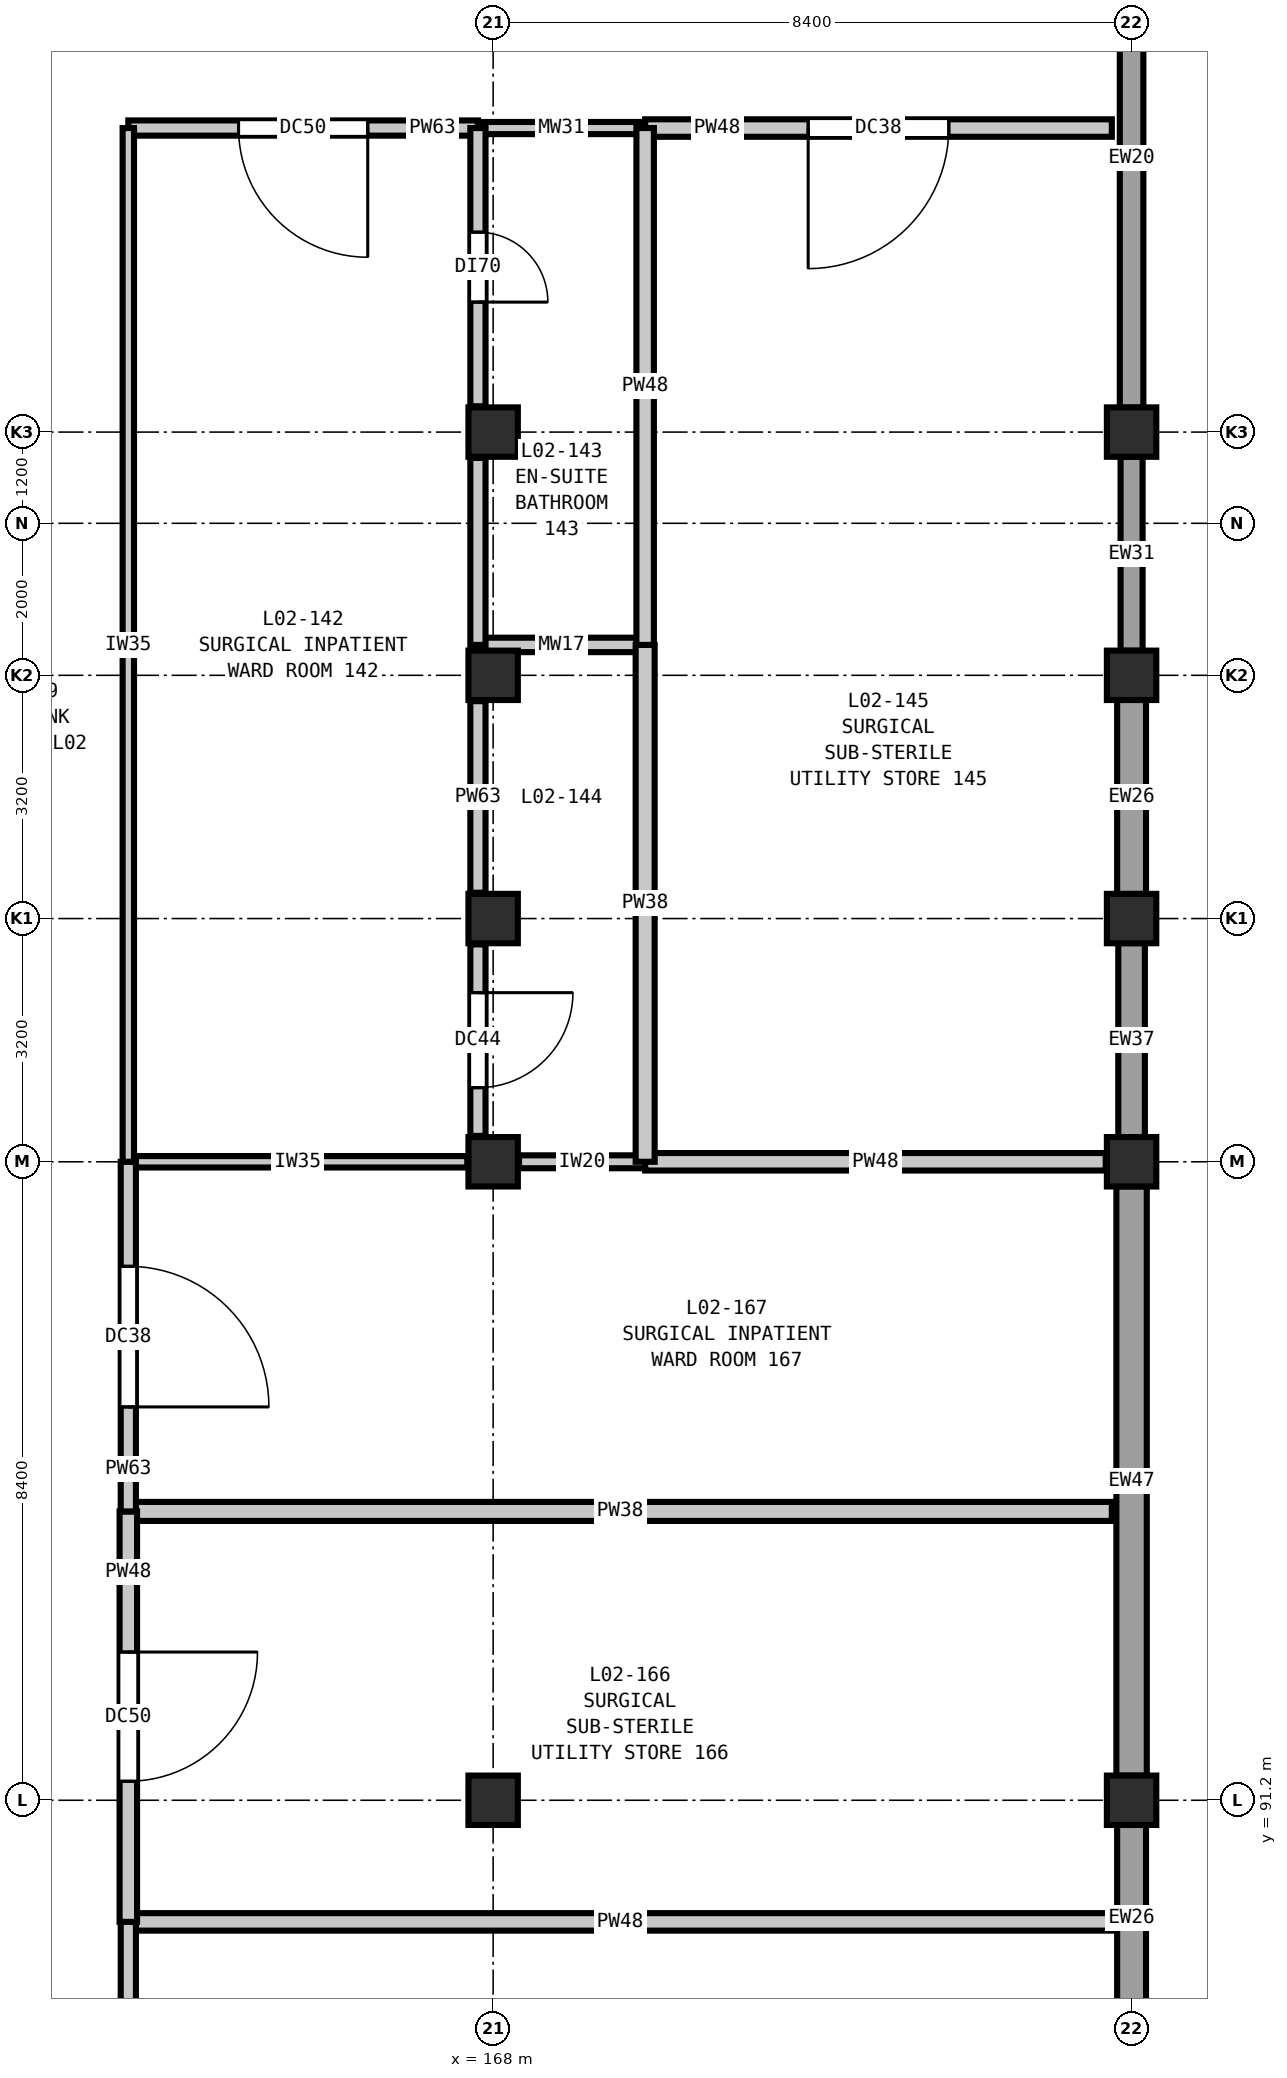
"""IFC4 building model, lengths in metres.
Left out: names, types, materials, properties, quantities, classifications, styles, units other than length and angle.
Written with IfcOpenShell. Run it as: python <this file> out.ifc"""

import sys

from ifc_helpers import new_model, si_unit, direction, frame, frame_2d, origin, origin_2d, place, context, subcontext, project, spatial, rectangle, extrude, element, fill, save


model = new_model("IFC4")
c1 = context("Model", 3, precision=1e-05, world=origin(), true_north=direction((0.0, 1.0)))
c2 = subcontext(c1, "Body", "Model", "MODEL_VIEW")
j1 = project(units=[si_unit("LENGTHUNIT", "METRE"), si_unit("PLANEANGLEUNIT", "RADIAN")], contexts=[c1])
p1 = place(None, origin())
s1 = spatial("IfcSite", under=j1, at=p1, CompositionType="ELEMENT")
p2 = place(p1, origin())
s2 = spatial("IfcBuilding", under=s1, at=p2, CompositionType="ELEMENT")
p3 = place(p2, frame((0.0, 0.0, 10.8)))
s3 = spatial("IfcBuildingStorey", under=s2, at=p3, CompositionType="ELEMENT", Elevation=10.8)
for number, where, z_axis, x_axis in (
    (1, (168.0, 91.2, 0.0), (0.0, 0.0, 1.0), (1.0, 0.0, 0.0)),
    (2, (168.0, 99.6, 0.0), (0.0, 0.0, 1.0), (1.0, 0.0, 0.0)),
    (3, (168.0, 102.8, 0.0), (0.0, 0.0, 1.0), (1.0, 0.0, 0.0)),
    (4, (168.0, 106.0, 0.0), (0.0, 0.0, 1.0), (1.0, 0.0, 0.0)),
    (5, (168.0, 109.2, 0.0), (0.0, 0.0, 1.0), (1.0, 0.0, 0.0)),
    (6, (176.4, 91.2, 0.0), (0.0, 0.0, 1.0), (1.0, 0.0, 0.0)),
    (7, (176.4, 99.6, 0.0), (0.0, 0.0, 1.0), (1.0, 0.0, 0.0)),
    (8, (176.4, 102.8, 0.0), (0.0, 0.0, 1.0), (1.0, 0.0, 0.0)),
    (9, (176.4, 106.0, 0.0), (0.0, 0.0, 1.0), (1.0, 0.0, 0.0)),
    (10, (176.4, 109.2, 0.0), (0.0, 0.0, 1.0), (1.0, 0.0, 0.0)),
):
    element("IfcColumn", number, at=place(p3, frame(where, z_axis=z_axis, x_axis=x_axis)), inside=s3, PredefinedType="COLUMN", context=c2, shape_type="SweptSolid", body=[
        extrude(rectangle(XDim=0.65, YDim=0.65, at=origin_2d()), origin(), (0.0, 0.0, 1.0), 5.4),
    ])
p4 = place(p3, frame((176.4, 116.077, 0.0), z_axis=(0.0, 0.0, 1.0), x_axis=(0.0, -1.0, 0.0)))
e11 = element("IfcWall", 11, at=p4, inside=s3, PredefinedType="SOLIDWALL", context=c2, shape_type="SweptSolid", body=[
    extrude(rectangle(XDim=6.554, YDim=0.31, at=frame_2d((3.277, 0.0))), origin(), (0.0, 0.0, 1.0), 4.68),
])
p5 = place(p3, frame((176.4, 108.877, 0.0), z_axis=(0.0, 0.0, 1.0), x_axis=(0.0, -1.0, 0.0)))
e12 = element("IfcWall", 12, at=p5, inside=s3, PredefinedType="SOLIDWALL", context=c2, shape_type="SweptSolid", body=[
    extrude(rectangle(XDim=2.554, YDim=0.29, at=frame_2d((1.277, 0.0))), origin(), (0.0, 0.0, 1.0), 4.68),
])
p6 = place(p3, frame((176.4, 105.677, 0.0), z_axis=(0.0, 0.0, 1.0), x_axis=(0.0, -1.0, 0.0)))
e13 = element("IfcWall", 13, at=p6, inside=s3, PredefinedType="SOLIDWALL", context=c2, shape_type="SweptSolid", body=[
    extrude(rectangle(XDim=2.554, YDim=0.38, at=frame_2d((1.277, 0.0))), origin(), (0.0, 0.0, 1.0), 4.68),
])
p7 = place(p3, frame((176.4, 102.477, 0.0), z_axis=(0.0, 0.0, 1.0), x_axis=(0.0, -1.0, 0.0)))
e14 = element("IfcWall", 14, at=p7, inside=s3, PredefinedType="SOLIDWALL", context=c2, shape_type="SweptSolid", body=[
    extrude(rectangle(XDim=2.554, YDim=0.35, at=frame_2d((1.277, 0.0))), origin(), (0.0, 0.0, 1.0), 4.68),
])
p8 = place(p3, frame((176.4, 99.277, 0.0), z_axis=(0.0, 0.0, 1.0), x_axis=(0.0, -1.0, 0.0)))
e15 = element("IfcWall", 15, at=p8, inside=s3, PredefinedType="SOLIDWALL", context=c2, shape_type="SweptSolid", body=[
    extrude(rectangle(XDim=7.754, YDim=0.4, at=frame_2d((3.877, 0.0))), origin(), (0.0, 0.0, 1.0), 4.68),
])
p9 = place(p3, frame((176.4, 90.877, 0.0), z_axis=(0.0, 0.0, 1.0), x_axis=(0.0, -1.0, 0.0)))
e16 = element("IfcWall", 16, at=p9, inside=s3, PredefinedType="SOLIDWALL", context=c2, shape_type="SweptSolid", body=[
    extrude(rectangle(XDim=7.779, YDim=0.38, at=frame_2d((3.89, 0.0))), origin(), (0.0, 0.0, 1.0), 4.68),
])
p10 = place(p9, frame((2.689, 0.0, 0.9)))
e17 = element("IfcOpeningElement", 17, at=p10, cuts=e16, PredefinedType="OPENING", context=c2, shape_type="SweptSolid", body=[
    extrude(rectangle(XDim=2.4, YDim=2.15, at=frame_2d((1.2, 1.075))), frame((0.0, 0.2, 0.0), z_axis=(0.0, -1.0, 0.0), x_axis=(1.0, 0.0, 0.0)), (0.0, 0.0, 1.0), 0.4),
])
p11 = place(p3, frame((163.2, 89.6, 0.0), z_axis=(0.0, 0.0, 1.0), x_axis=(1.0, 0.0, 0.0)))
e18 = element("IfcWall", 18, at=p11, inside=s3, PredefinedType="PARTITIONING", context=c2, shape_type="SweptSolid", body=[
    extrude(rectangle(XDim=12.94, YDim=0.23, at=frame_2d((6.47, 0.0))), origin(), (0.0, 0.0, 1.0), 5.07),
])
p12 = place(p3, frame((163.2, 95.0, 0.0), z_axis=(0.0, 0.0, 1.0), x_axis=(1.0, 0.0, 0.0)))
e19 = element("IfcWall", 19, at=p12, inside=s3, PredefinedType="PARTITIONING", context=c2, shape_type="SweptSolid", body=[
    extrude(rectangle(XDim=12.94, YDim=0.25, at=frame_2d((6.47, 0.0))), origin(), (0.0, 0.0, 1.0), 5.07),
])
p13 = place(p3, frame((163.2, 99.6, 0.0), z_axis=(0.0, 0.0, 1.0), x_axis=(1.0, 0.0, 0.0)))
e20 = element("IfcWall", 20, at=p13, inside=s3, PredefinedType="PARTITIONING", context=c2, shape_type="SweptSolid", body=[
    extrude(rectangle(XDim=4.46, YDim=0.15, at=frame_2d((2.23, 0.0))), origin(), (0.0, 0.0, 1.0), 4.735),
])
p14 = place(p3, frame((168.34, 99.6, 0.0), z_axis=(0.0, 0.0, 1.0), x_axis=(1.0, 0.0, 0.0)))
e21 = element("IfcWall", 21, at=p14, inside=s3, PredefinedType="PARTITIONING", context=c2, shape_type="SweptSolid", body=[
    extrude(rectangle(XDim=1.66, YDim=0.17, at=frame_2d((0.83, 0.0))), origin(), (0.0, 0.0, 1.0), 4.735),
])
p15 = place(p3, frame((170.0, 99.6, 0.0), z_axis=(0.0, 0.0, 1.0), x_axis=(1.0, 0.0, 0.0)))
e22 = element("IfcWall", 22, at=p15, inside=s3, PredefinedType="PARTITIONING", context=c2, shape_type="SweptSolid", body=[
    extrude(rectangle(XDim=6.06, YDim=0.23, at=frame_2d((3.03, 0.0))), origin(), (0.0, 0.0, 1.0), 4.735),
])
p16 = place(p3, frame((167.8, 106.4, 0.0), z_axis=(0.0, 0.0, 1.0), x_axis=(1.0, 0.0, 0.0)))
e23 = element("IfcWall", 23, at=p16, inside=s3, PredefinedType="PLUMBINGWALL", context=c2, shape_type="SweptSolid", body=[
    extrude(rectangle(XDim=2.2, YDim=0.19, at=frame_2d((1.1, 0.0))), origin(), (0.0, 0.0, 1.0), 5.07),
])
p17 = place(p3, frame((163.2, 113.2, 0.0), z_axis=(0.0, 0.0, 1.0), x_axis=(1.0, 0.0, 0.0)))
e24 = element("IfcWall", 24, at=p17, inside=s3, PredefinedType="PARTITIONING", context=c2, shape_type="SweptSolid", body=[
    extrude(rectangle(XDim=4.6, YDim=0.2, at=frame_2d((2.3, 0.0))), origin(), (0.0, 0.0, 1.0), 5.07),
])
p18 = place(p17, frame((1.45, 0.0, 0.0)))
e25 = element("IfcOpeningElement", 25, at=p18, cuts=e24, PredefinedType="OPENING", context=c2, shape_type="SweptSolid", body=[
    extrude(rectangle(XDim=1.7, YDim=2.3, at=frame_2d((0.85, 1.15))), frame((0.0, 0.11, 0.0), z_axis=(0.0, -1.0, 0.0), x_axis=(1.0, 0.0, 0.0)), (0.0, 0.0, 1.0), 0.22),
])
p19 = place(p3, frame((167.8, 113.2, 0.0), z_axis=(0.0, 0.0, 1.0), x_axis=(1.0, 0.0, 0.0)))
e26 = element("IfcWall", 26, at=p19, inside=s3, PredefinedType="PLUMBINGWALL", context=c2, shape_type="SweptSolid", body=[
    extrude(rectangle(XDim=2.2, YDim=0.16, at=frame_2d((1.1, 0.0))), origin(), (0.0, 0.0, 1.0), 5.07),
])
p20 = place(p3, frame((170.0, 113.2, 0.0), z_axis=(0.0, 0.0, 1.0), x_axis=(1.0, 0.0, 0.0)))
e27 = element("IfcWall", 27, at=p20, inside=s3, PredefinedType="PARTITIONING", context=c2, shape_type="SweptSolid", body=[
    extrude(rectangle(XDim=6.14, YDim=0.23, at=frame_2d((3.07, 0.0))), origin(), (0.0, 0.0, 1.0), 5.07),
])
p21 = place(p20, frame((2.145, 0.0, 0.0)))
e28 = element("IfcOpeningElement", 28, at=p21, cuts=e27, PredefinedType="OPENING", context=c2, shape_type="SweptSolid", body=[
    extrude(rectangle(XDim=1.85, YDim=2.3, at=frame_2d((0.925, 1.15))), frame((0.0, 0.125, 0.0), z_axis=(0.0, -1.0, 0.0), x_axis=(1.0, 0.0, 0.0)), (0.0, 0.0, 1.0), 0.25),
])
p22 = place(p3, frame((163.2, 82.8, 0.0), z_axis=(0.0, 0.0, 1.0), x_axis=(0.0, 1.0, 0.0)))
e29 = element("IfcWall", 29, at=p22, inside=s3, PredefinedType="PARTITIONING", context=c2, shape_type="SweptSolid", body=[
    extrude(rectangle(XDim=6.8, YDim=0.2, at=frame_2d((3.4, 0.0))), origin(), (0.0, 0.0, 1.0), 5.07),
])
p23 = place(p22, frame((2.625, 0.0, 0.0)))
e30 = element("IfcOpeningElement", 30, at=p23, cuts=e29, PredefinedType="OPENING", context=c2, shape_type="SweptSolid", body=[
    extrude(rectangle(XDim=1.55, YDim=2.25, at=frame_2d((0.775, 1.125))), frame((0.0, 0.11, 0.0), z_axis=(0.0, -1.0, 0.0), x_axis=(1.0, 0.0, 0.0)), (0.0, 0.0, 1.0), 0.22),
])
p24 = place(p3, frame((163.2, 89.6, 0.0), z_axis=(0.0, 0.0, 1.0), x_axis=(0.0, 1.0, 0.0)))
e31 = element("IfcWall", 31, at=p24, inside=s3, PredefinedType="PARTITIONING", context=c2, shape_type="SweptSolid", body=[
    extrude(rectangle(XDim=5.4, YDim=0.23, at=frame_2d((2.7, 0.0))), origin(), (0.0, 0.0, 1.0), 5.07),
])
p25 = place(p24, frame((1.85, 0.0, 0.0)))
e32 = element("IfcOpeningElement", 32, at=p25, cuts=e31, PredefinedType="OPENING", context=c2, shape_type="SweptSolid", body=[
    extrude(rectangle(XDim=1.7, YDim=2.3, at=frame_2d((0.85, 1.15))), frame((0.0, 0.125, 0.0), z_axis=(0.0, -1.0, 0.0), x_axis=(1.0, 0.0, 0.0)), (0.0, 0.0, 1.0), 0.25),
])
p26 = place(p3, frame((163.2, 95.0, 0.0), z_axis=(0.0, 0.0, 1.0), x_axis=(0.0, 1.0, 0.0)))
e33 = element("IfcWall", 33, at=p26, inside=s3, PredefinedType="PARTITIONING", context=c2, shape_type="SweptSolid", body=[
    extrude(rectangle(XDim=4.6, YDim=0.2, at=frame_2d((2.3, 0.0))), origin(), (0.0, 0.0, 1.0), 5.07),
])
p27 = place(p26, frame((1.375, 0.0, 0.0)))
e34 = element("IfcOpeningElement", 34, at=p27, cuts=e33, PredefinedType="OPENING", context=c2, shape_type="SweptSolid", body=[
    extrude(rectangle(XDim=1.85, YDim=2.3, at=frame_2d((0.925, 1.15))), frame((0.0, 0.11, 0.0), z_axis=(0.0, -1.0, 0.0), x_axis=(1.0, 0.0, 0.0)), (0.0, 0.0, 1.0), 0.22),
])
p28 = place(p3, frame((163.2, 99.6, 0.0), z_axis=(0.0, 0.0, 1.0), x_axis=(0.0, 1.0, 0.0)))
e35 = element("IfcWall", 35, at=p28, inside=s3, PredefinedType="PARTITIONING", context=c2, shape_type="SweptSolid", body=[
    extrude(rectangle(XDim=13.6, YDim=0.15, at=frame_2d((6.8, 0.0))), origin(), (0.0, 0.0, 1.0), 5.07),
])
p29 = place(p3, frame((167.8, 99.94, 0.0), z_axis=(0.0, 0.0, 1.0), x_axis=(0.0, 1.0, 0.0)))
e36 = element("IfcWall", 36, at=p29, inside=s3, PredefinedType="PARTITIONING", context=c2, shape_type="SweptSolid", body=[
    extrude(rectangle(XDim=2.52, YDim=0.2, at=frame_2d((1.26, 0.0))), origin(), (0.0, 0.0, 1.0), 4.735),
])
p30 = place(p29, frame((0.635, 0.0, 0.0)))
e37 = element("IfcOpeningElement", 37, at=p30, cuts=e36, PredefinedType="OPENING", context=c2, shape_type="SweptSolid", body=[
    extrude(rectangle(XDim=1.25, YDim=2.15, at=frame_2d((0.625, 1.075))), frame((0.0, 0.11, 0.0), z_axis=(0.0, -1.0, 0.0), x_axis=(1.0, 0.0, 0.0)), (0.0, 0.0, 1.0), 0.22),
])
p31 = place(p3, frame((167.8, 103.14, 0.0), z_axis=(0.0, 0.0, 1.0), x_axis=(0.0, 1.0, 0.0)))
e38 = element("IfcWall", 38, at=p31, inside=s3, PredefinedType="PARTITIONING", context=c2, shape_type="SweptSolid", body=[
    extrude(rectangle(XDim=2.52, YDim=0.2, at=frame_2d((1.26, 0.0))), origin(), (0.0, 0.0, 1.0), 4.735),
])
p32 = place(p3, frame((167.8, 109.54, 0.0), z_axis=(0.0, 0.0, 1.0), x_axis=(0.0, 1.0, 0.0)))
e39 = element("IfcWall", 39, at=p32, inside=s3, PredefinedType="PARTITIONING", context=c2, shape_type="SweptSolid", body=[
    extrude(rectangle(XDim=3.66, YDim=0.2, at=frame_2d((1.83, 0.0))), origin(), (0.0, 0.0, 1.0), 4.735),
])
p33 = place(p32, frame((1.37, 0.0, 0.0)))
e40 = element("IfcOpeningElement", 40, at=p33, cuts=e39, PredefinedType="OPENING", context=c2, shape_type="SweptSolid", body=[
    extrude(rectangle(XDim=0.92, YDim=2.1, at=frame_2d((0.46, 1.05))), frame((0.0, 0.11, 0.0), z_axis=(0.0, -1.0, 0.0), x_axis=(1.0, 0.0, 0.0)), (0.0, 0.0, 1.0), 0.22),
])
p34 = place(p3, frame((167.8, 106.4, 0.0), z_axis=(0.0, 0.0, 1.0), x_axis=(0.0, 1.0, 0.0)))
e41 = element("IfcWall", 41, at=p34, inside=s3, PredefinedType="PARTITIONING", context=c2, shape_type="SweptSolid", body=[
    extrude(rectangle(XDim=2.46, YDim=0.2, at=frame_2d((1.23, 0.0))), origin(), (0.0, 0.0, 1.0), 4.735),
])
p35 = place(p3, frame((170.0, 99.6, 0.0), z_axis=(0.0, 0.0, 1.0), x_axis=(0.0, 1.0, 0.0)))
e42 = element("IfcWall", 42, at=p35, inside=s3, PredefinedType="PARTITIONING", context=c2, shape_type="SweptSolid", body=[
    extrude(rectangle(XDim=6.8, YDim=0.25, at=frame_2d((3.4, 0.0))), origin(), (0.0, 0.0, 1.0), 5.07),
])
p36 = place(p3, frame((170.0, 106.4, 0.0), z_axis=(0.0, 0.0, 1.0), x_axis=(0.0, 1.0, 0.0)))
e43 = element("IfcWall", 43, at=p36, inside=s3, PredefinedType="PARTITIONING", context=c2, shape_type="SweptSolid", body=[
    extrude(rectangle(XDim=6.8, YDim=0.23, at=frame_2d((3.4, 0.0))), origin(), (0.0, 0.0, 1.0), 5.07),
])
p37 = place(p18, frame((1.7, 0.0, 0.0), z_axis=(0.0, 0.0, 1.0), x_axis=(-1.0, 0.0, 0.0)))
e44 = element("IfcDoor", 44, at=p37, inside=s3, OperationType="SINGLE_SWING_LEFT", PredefinedType="DOOR", context=c2, shape_type="SweptSolid", body=[
    extrude(rectangle(XDim=1.7, YDim=2.3, at=frame_2d((0.85, 1.15))), frame((0.0, 0.025, 0.0), z_axis=(0.0, -1.0, 0.0), x_axis=(1.0, 0.0, 0.0)), (0.0, 0.0, 1.0), 0.05),
])
fill(e25, e44)
p38 = place(p21, frame((1.85, 0.0, 0.0), z_axis=(0.0, 0.0, 1.0), x_axis=(-1.0, 0.0, 0.0)))
e45 = element("IfcDoor", 45, at=p38, inside=s3, OperationType="SINGLE_SWING_RIGHT", PredefinedType="DOOR", context=c2, shape_type="SweptSolid", body=[
    extrude(rectangle(XDim=1.85, YDim=2.3, at=frame_2d((0.925, 1.15))), frame((0.0, 0.025, 0.0), z_axis=(0.0, -1.0, 0.0), x_axis=(1.0, 0.0, 0.0)), (0.0, 0.0, 1.0), 0.05),
])
fill(e28, e45)
p39 = place(p25, frame((1.7, 0.0, 0.0), z_axis=(0.0, 0.0, 1.0), x_axis=(-1.0, 0.0, 0.0)))
e46 = element("IfcDoor", 46, at=p39, inside=s3, OperationType="SINGLE_SWING_LEFT", PredefinedType="DOOR", context=c2, shape_type="SweptSolid", body=[
    extrude(rectangle(XDim=1.7, YDim=2.3, at=frame_2d((0.85, 1.15))), frame((0.0, 0.025, 0.0), z_axis=(0.0, -1.0, 0.0), x_axis=(1.0, 0.0, 0.0)), (0.0, 0.0, 1.0), 0.05),
])
fill(e32, e46)
p40 = place(p27, frame((1.85, 0.0, 0.0), z_axis=(0.0, 0.0, 1.0), x_axis=(-1.0, 0.0, 0.0)))
e47 = element("IfcDoor", 47, at=p40, inside=s3, OperationType="SINGLE_SWING_RIGHT", PredefinedType="DOOR", context=c2, shape_type="SweptSolid", body=[
    extrude(rectangle(XDim=1.85, YDim=2.3, at=frame_2d((0.925, 1.15))), frame((0.0, 0.025, 0.0), z_axis=(0.0, -1.0, 0.0), x_axis=(1.0, 0.0, 0.0)), (0.0, 0.0, 1.0), 0.05),
])
fill(e34, e47)
p41 = place(p30, frame((1.25, 0.0, 0.0), z_axis=(0.0, 0.0, 1.0), x_axis=(-1.0, 0.0, 0.0)))
e48 = element("IfcDoor", 48, at=p41, inside=s3, OperationType="SINGLE_SWING_LEFT", PredefinedType="DOOR", context=c2, shape_type="SweptSolid", body=[
    extrude(rectangle(XDim=1.25, YDim=2.15, at=frame_2d((0.625, 1.075))), frame((0.0, 0.025, 0.0), z_axis=(0.0, -1.0, 0.0), x_axis=(1.0, 0.0, 0.0)), (0.0, 0.0, 1.0), 0.05),
])
fill(e37, e48)
p42 = place(p33, frame((0.92, 0.0, 0.0), z_axis=(0.0, 0.0, 1.0), x_axis=(-1.0, 0.0, 0.0)))
e49 = element("IfcDoor", 49, at=p42, inside=s3, OperationType="SINGLE_SWING_RIGHT", PredefinedType="DOOR", context=c2, shape_type="SweptSolid", body=[
    extrude(rectangle(XDim=0.92, YDim=2.1, at=frame_2d((0.46, 1.05))), frame((0.0, 0.025, 0.0), z_axis=(0.0, -1.0, 0.0), x_axis=(1.0, 0.0, 0.0)), (0.0, 0.0, 1.0), 0.05),
])
fill(e40, e49)
save(model, sys.argv[1])
